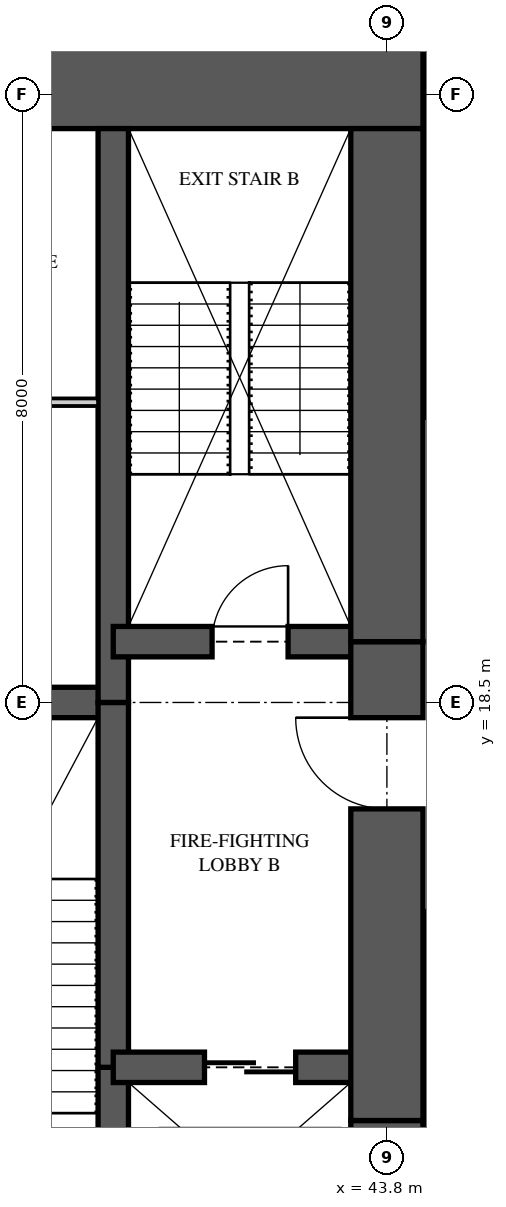
"""IFC4 building model, lengths in metres.
Left out: names, types, materials, properties, quantities, classifications, styles, units other than length and angle.
Written with IfcOpenShell. Run it as: python <this file> out.ifc"""

import sys

from ifc_helpers import new_model, si_unit, direction, frame, frame_2d, origin, place, context, subcontext, project, spatial, rectangle, extrude, element, fill, save


model = new_model("IFC4")
c1 = context("Model", 3, precision=1e-05, world=origin(), true_north=direction((0.0, 1.0)))
c2 = subcontext(c1, "Body", "Model", "MODEL_VIEW")
j1 = project(units=[si_unit("LENGTHUNIT", "METRE"), si_unit("PLANEANGLEUNIT", "RADIAN")], contexts=[c1])
p1 = place(None, origin())
s1 = spatial("IfcSite", under=j1, at=p1, CompositionType="ELEMENT")
p2 = place(p1, origin())
s2 = spatial("IfcBuilding", under=s1, at=p2, CompositionType="ELEMENT")
p3 = place(p2, frame((0.0, 0.0, 57.85)))
s3 = spatial("IfcBuildingStorey", under=s2, at=p3, CompositionType="ELEMENT", Elevation=57.85)
p4 = place(p3, frame((44.275, 26.875, 0.0), z_axis=(0.0, 0.0, 1.0), x_axis=(-1.0, 0.0, 0.0)))
e1 = element("IfcWall", 1, at=p4, inside=s3, PredefinedType="SHEAR", context=c2, shape_type="SweptSolid", body=[
    extrude(rectangle(XDim=8.375, YDim=1.65, at=frame_2d((4.188, 0.0))), origin(), (0.0, 0.0, 1.0), 3.35),
])
p5 = place(p4, frame((5.775, 0.0, 0.0)))
e2 = element("IfcOpeningElement", 2, at=p5, cuts=e1, PredefinedType="OPENING", context=c2, shape_type="SweptSolid", body=[
    extrude(rectangle(XDim=0.9, YDim=2.1, at=frame_2d((0.45, 1.05))), frame((0.0, 0.835, 0.0), z_axis=(0.0, -1.0, 0.0), x_axis=(1.0, 0.0, 0.0)), (0.0, 0.0, 1.0), 1.67),
])
p6 = place(p3, frame((43.8, 10.95, 0.0), z_axis=(0.0, 0.0, 1.0), x_axis=(0.0, 1.0, 0.0)))
e3 = element("IfcWall", 3, at=p6, inside=s3, PredefinedType="SHEAR", context=c2, shape_type="SweptSolid", body=[
    extrude(rectangle(XDim=2.05, YDim=0.95, at=frame_2d((1.025, 0.0))), origin(), (0.0, 0.0, 1.0), 3.35),
])
p7 = place(p3, frame((43.8, 13.0, 0.0), z_axis=(0.0, 0.0, 1.0), x_axis=(0.0, 1.0, 0.0)))
e4 = element("IfcWall", 4, at=p7, inside=s3, PredefinedType="SHEAR", context=c2, shape_type="SweptSolid", body=[
    extrude(rectangle(XDim=6.3, YDim=0.95, at=frame_2d((3.15, 0.0))), origin(), (0.0, 0.0, 1.0), 3.35),
])
p8 = place(p7, frame((4.1, 0.0, 0.0)))
e5 = element("IfcOpeningElement", 5, at=p8, cuts=e4, PredefinedType="OPENING", context=c2, shape_type="SweptSolid", body=[
    extrude(rectangle(XDim=1.2, YDim=2.2, at=frame_2d((0.6, 1.1))), frame((0.0, 0.485, 0.0), z_axis=(0.0, -1.0, 0.0), x_axis=(1.0, 0.0, 0.0)), (0.0, 0.0, 1.0), 0.97),
])
p9 = place(p3, frame((43.8, 19.3, 0.0), z_axis=(0.0, 0.0, 1.0), x_axis=(0.0, 1.0, 0.0)))
e6 = element("IfcWall", 6, at=p9, inside=s3, PredefinedType="SHEAR", context=c2, shape_type="SweptSolid", body=[
    extrude(rectangle(XDim=6.75, YDim=0.95, at=frame_2d((3.375, 0.0))), origin(), (0.0, 0.0, 1.0), 3.35),
])
p10 = place(p3, frame((40.2, 10.95, 0.0), z_axis=(0.0, 0.0, 1.0), x_axis=(0.0, 1.0, 0.0)))
e7 = element("IfcWall", 7, at=p10, inside=s3, PredefinedType="SHEAR", context=c2, shape_type="SweptSolid", body=[
    extrude(rectangle(XDim=2.75, YDim=0.4, at=frame_2d((1.375, 0.0))), origin(), (0.0, 0.0, 1.0), 3.35),
])
p11 = place(p3, frame((40.2, 13.7, 0.0), z_axis=(0.0, 0.0, 1.0), x_axis=(0.0, 1.0, 0.0)))
e8 = element("IfcWall", 8, at=p11, inside=s3, PredefinedType="SHEAR", context=c2, shape_type="SweptSolid", body=[
    extrude(rectangle(XDim=4.8, YDim=0.4, at=frame_2d((2.4, 0.0))), origin(), (0.0, 0.0, 1.0), 3.35),
])
p12 = place(p3, frame((40.2, 18.5, 0.0), z_axis=(0.0, 0.0, 1.0), x_axis=(0.0, 1.0, 0.0)))
e9 = element("IfcWall", 9, at=p12, inside=s3, PredefinedType="SHEAR", context=c2, shape_type="SweptSolid", body=[
    extrude(rectangle(XDim=7.55, YDim=0.4, at=frame_2d((3.775, 0.0))), origin(), (0.0, 0.0, 1.0), 3.35),
])
p13 = place(p3, frame((35.9, 18.5, 0.0), z_axis=(0.0, 0.0, 1.0), x_axis=(1.0, 0.0, 0.0)))
e10 = element("IfcWall", 10, at=p13, inside=s3, PredefinedType="SHEAR", context=c2, shape_type="SweptSolid", body=[
    extrude(rectangle(XDim=4.3, YDim=0.4, at=frame_2d((2.15, 0.0))), origin(), (0.0, 0.0, 1.0), 3.35),
])
p14 = place(p3, frame((40.2, 13.7, 0.0), z_axis=(0.0, 0.0, 1.0), x_axis=(1.0, 0.0, 0.0)))
e11 = element("IfcWall", 11, at=p14, inside=s3, PredefinedType="SHEAR", context=c2, shape_type="SweptSolid", body=[
    extrude(rectangle(XDim=3.6, YDim=0.4, at=frame_2d((1.8, 0.0))), origin(), (0.0, 0.0, 1.0), 3.35),
])
p15 = place(p14, frame((1.2, 0.0, 0.0)))
e12 = element("IfcOpeningElement", 12, at=p15, cuts=e11, PredefinedType="OPENING", context=c2, shape_type="SweptSolid", body=[
    extrude(rectangle(XDim=1.2, YDim=2.1, at=frame_2d((0.6, 1.05))), frame((0.0, 0.21, 0.0), z_axis=(0.0, -1.0, 0.0), x_axis=(1.0, 0.0, 0.0)), (0.0, 0.0, 1.0), 0.42),
])
p16 = place(p3, frame((40.2, 19.3, 0.0), z_axis=(0.0, 0.0, 1.0), x_axis=(1.0, 0.0, 0.0)))
e13 = element("IfcWall", 13, at=p16, inside=s3, PredefinedType="SHEAR", context=c2, shape_type="SweptSolid", body=[
    extrude(rectangle(XDim=3.6, YDim=0.4, at=frame_2d((1.8, 0.0))), origin(), (0.0, 0.0, 1.0), 3.35),
])
p17 = place(p16, frame((1.3, 0.0, 0.0)))
e14 = element("IfcOpeningElement", 14, at=p17, cuts=e13, PredefinedType="OPENING", context=c2, shape_type="SweptSolid", body=[
    extrude(rectangle(XDim=1.0, YDim=2.1, at=frame_2d((0.5, 1.05))), frame((0.0, 0.21, 0.0), z_axis=(0.0, -1.0, 0.0), x_axis=(1.0, 0.0, 0.0)), (0.0, 0.0, 1.0), 0.42),
])
p18 = place(p3, frame((36.1, 22.45, 0.0), z_axis=(0.0, 0.0, 1.0), x_axis=(1.0, 0.0, 0.0)))
e15 = element("IfcWall", 15, at=p18, inside=s3, PredefinedType="PARTITIONING", context=c2, shape_type="SweptSolid", body=[
    extrude(rectangle(XDim=3.9, YDim=0.1, at=frame_2d((1.95, 0.0))), origin(), (0.0, 0.0, 1.0), 3.11),
])
p19 = place(p18, frame((1.5, 0.0, 0.0)))
e16 = element("IfcOpeningElement", 16, at=p19, cuts=e15, PredefinedType="OPENING", context=c2, shape_type="SweptSolid", body=[
    extrude(rectangle(XDim=0.9, YDim=2.1, at=frame_2d((0.45, 1.05))), frame((0.0, 0.06, 0.0), z_axis=(0.0, -1.0, 0.0), x_axis=(1.0, 0.0, 0.0)), (0.0, 0.0, 1.0), 0.12),
])
p20 = place(p17, origin())
e17 = element("IfcDoor", 17, at=p20, inside=s3, OperationType="SINGLE_SWING_RIGHT", PredefinedType="DOOR", context=c2, shape_type="SweptSolid", body=[
    extrude(rectangle(XDim=1.0, YDim=2.1, at=frame_2d((0.5, 1.05))), frame((0.0, 0.025, 0.0), z_axis=(0.0, -1.0, 0.0), x_axis=(1.0, 0.0, 0.0)), (0.0, 0.0, 1.0), 0.05),
])
fill(e14, e17)
p21 = place(p8, origin())
e18 = element("IfcDoor", 18, at=p21, inside=s3, OperationType="SINGLE_SWING_RIGHT", PredefinedType="DOOR", context=c2, shape_type="SweptSolid", body=[
    extrude(rectangle(XDim=1.2, YDim=2.2, at=frame_2d((0.6, 1.1))), frame((0.0, 0.025, 0.0), z_axis=(0.0, -1.0, 0.0), x_axis=(1.0, 0.0, 0.0)), (0.0, 0.0, 1.0), 0.05),
])
fill(e5, e18)
p22 = place(p15, origin())
e19 = element("IfcDoor", 19, at=p22, inside=s3, OperationType="SLIDING_TO_LEFT", PredefinedType="DOOR", context=c2, shape_type="SweptSolid", body=[
    extrude(rectangle(XDim=1.2, YDim=2.1, at=frame_2d((0.6, 1.05))), frame((0.0, 0.025, 0.0), z_axis=(0.0, -1.0, 0.0), x_axis=(1.0, 0.0, 0.0)), (0.0, 0.0, 1.0), 0.05),
])
fill(e12, e19)
save(model, sys.argv[1])
